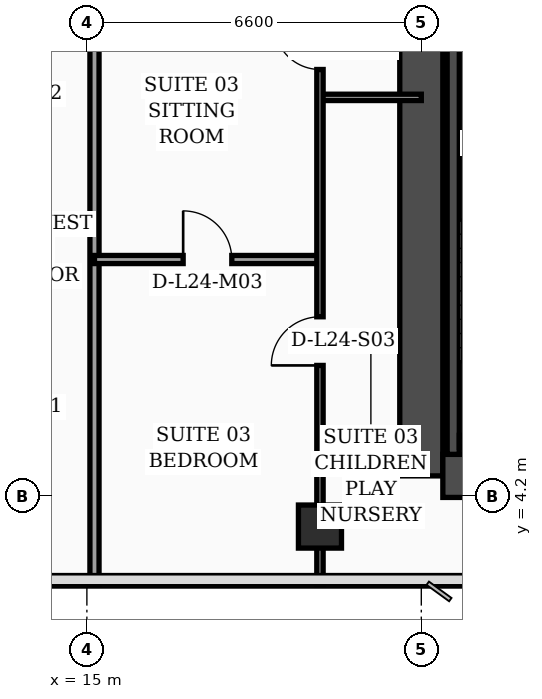
"""IFC4 building model, lengths in metres.
Left out: names, types, materials, properties, quantities, classifications, styles, units other than length and angle.
Written with IfcOpenShell. Run it as: python <this file> out.ifc"""

import sys

from ifc_helpers import new_model, si_unit, direction, frame, frame_2d, origin, origin_2d, place, context, subcontext, project, spatial, rectangle, hollow_rectangle, extrude, element, fill, save


model = new_model("IFC4")
c1 = context("Model", 3, precision=1e-05, world=origin(), true_north=direction((0.0, 1.0)))
c2 = subcontext(c1, "Body", "Model", "MODEL_VIEW")
j1 = project(units=[si_unit("LENGTHUNIT", "METRE"), si_unit("PLANEANGLEUNIT", "RADIAN")], contexts=[c1])
p1 = place(None, origin())
s1 = spatial("IfcSite", under=j1, at=p1, CompositionType="ELEMENT")
p2 = place(p1, origin())
s2 = spatial("IfcBuilding", under=s1, at=p2, CompositionType="ELEMENT")
p3 = place(p2, frame((0.0, 0.0, 101.2)))
s3 = spatial("IfcBuildingStorey", under=s2, at=p3, CompositionType="ELEMENT", Elevation=101.2)
p4 = place(p3, frame((21.6, 4.6, 0.0), z_axis=(0.0, 0.0, 1.0), x_axis=(0.0, 1.0, 0.0)))
e1 = element("IfcWall", 1, at=p4, inside=s3, PredefinedType="SHEAR", context=c2, shape_type="SweptSolid", body=[
    extrude(rectangle(XDim=10.4, YDim=0.85, at=frame_2d((5.2, 0.0))), origin(), (0.0, 0.0, 1.0), 3.56),
])
p5 = place(p3, frame((22.025, 4.6, 0.0), z_axis=(0.0, 0.0, 1.0), x_axis=(1.0, 0.0, 0.0)))
e2 = element("IfcWall", 2, at=p5, inside=s3, PredefinedType="SHEAR", context=c2, shape_type="SweptSolid", body=[
    extrude(rectangle(XDim=9.95, YDim=0.85, at=frame_2d((4.975, 0.0))), origin(), (0.0, 0.0, 1.0), 3.56),
])
p6 = place(p3, frame((22.23, 5.025, 0.0), z_axis=(0.0, 0.0, 1.0), x_axis=(0.0, 1.0, 0.0)))
e3 = element("IfcWall", 3, at=p6, inside=s3, PredefinedType="SOLIDWALL", context=c2, shape_type="SweptSolid", body=[
    extrude(rectangle(XDim=9.465, YDim=0.24, at=frame_2d((4.732, 0.0))), origin(), (0.0, 0.0, 1.0), 3.56),
])
p7 = place(p3, frame((22.35, 5.28, 0.0), z_axis=(0.0, 0.0, 1.0), x_axis=(1.0, 0.0, 0.0)))
e4 = element("IfcWall", 4, at=p7, inside=s3, PredefinedType="SOLIDWALL", context=c2, shape_type="SweptSolid", body=[
    extrude(rectangle(XDim=3.1, YDim=0.24, at=frame_2d((1.55, 0.0))), origin(), (0.0, 0.0, 1.0), 3.56),
])
p8 = place(p3, frame((19.6, 3.6, 0.0), z_axis=(0.0, 0.0, 1.0), x_axis=(1.0, 0.0, 0.0)))
e5 = element("IfcColumn", 5, at=p8, inside=s3, PredefinedType="COLUMN", context=c2, shape_type="SweptSolid", body=[
    extrude(hollow_rectangle(XDim=0.85, YDim=0.85, WallThickness=0.036, at=origin_2d()), origin(), (0.0, 0.0, 1.0), 3.56),
])
p9 = place(p3, frame((15.15, 2.44, 0.0), z_axis=(0.0, 0.0, 1.0), x_axis=(0.0, 1.0, 0.0)))
e6 = element("IfcWall", 6, at=p9, inside=s3, PredefinedType="PARTITIONING", context=c2, shape_type="SweptSolid", body=[
    extrude(rectangle(XDim=12.71, YDim=0.18, at=frame_2d((6.355, 0.0))), origin(), (0.0, 0.0, 1.0), 3.04),
])
p10 = place(p3, frame((19.6, 12.07, 0.0), z_axis=(0.0, 0.0, 1.0), x_axis=(1.0, 0.0, 0.0)))
e7 = element("IfcWall", 7, at=p10, inside=s3, PredefinedType="PARTITIONING", context=c2, shape_type="SweptSolid", body=[
    extrude(rectangle(XDim=2.0, YDim=0.125, at=frame_2d((1.0, 0.0))), origin(), (0.0, 0.0, 1.0), 3.56),
])
p11 = place(p3, frame((15.15, 8.87, 0.0), z_axis=(0.0, 0.0, 1.0), x_axis=(1.0, 0.0, 0.0)))
e8 = element("IfcWall", 8, at=p11, inside=s3, PredefinedType="PARTITIONING", context=c2, shape_type="SweptSolid", body=[
    extrude(rectangle(XDim=4.45, YDim=0.16, at=frame_2d((2.225, 0.0))), origin(), (0.0, 0.0, 1.0), 3.56),
])
p12 = place(p11, frame((1.75, 0.0, 0.0)))
e9 = element("IfcOpeningElement", 9, at=p12, cuts=e8, PredefinedType="OPENING", context=c2, shape_type="SweptSolid", body=[
    extrude(rectangle(XDim=0.96, YDim=2.2, at=frame_2d((0.48, 1.1))), frame((0.0, 0.09, 0.0), z_axis=(0.0, -1.0, 0.0), x_axis=(1.0, 0.0, 0.0)), (0.0, 0.0, 1.0), 0.18),
])
p13 = place(p3, frame((19.6, 2.44, 0.0), z_axis=(0.0, 0.0, 1.0), x_axis=(0.0, 1.0, 0.0)))
e10 = element("IfcWall", 10, at=p13, inside=s3, PredefinedType="PARTITIONING", context=c2, shape_type="SweptSolid", body=[
    extrude(rectangle(XDim=12.71, YDim=0.125, at=frame_2d((6.355, 0.0))), origin(), (0.0, 0.0, 1.0), 2.49),
])
p14 = place(p13, frame((4.34, 0.0, 0.0)))
e11 = element("IfcOpeningElement", 11, at=p14, cuts=e10, PredefinedType="OPENING", context=c2, shape_type="SweptSolid", body=[
    extrude(rectangle(XDim=0.96, YDim=2.2, at=frame_2d((0.48, 1.1))), frame((0.0, 0.073, 0.0), z_axis=(0.0, -1.0, 0.0), x_axis=(1.0, 0.0, 0.0)), (0.0, 0.0, 1.0), 0.145),
])
p15 = place(p13, frame((10.18, 0.0, 0.0)))
e12 = element("IfcOpeningElement", 12, at=p15, cuts=e10, PredefinedType="OPENING", context=c2, shape_type="SweptSolid", body=[
    extrude(rectangle(XDim=0.9, YDim=2.15, at=frame_2d((0.45, 1.075))), frame((0.0, 0.073, 0.0), z_axis=(0.0, -1.0, 0.0), x_axis=(1.0, 0.0, 0.0)), (0.0, 0.0, 1.0), 0.145),
])
p16 = place(p12, origin())
e13 = element("IfcDoor", 13, at=p16, inside=s3, OperationType="SINGLE_SWING_LEFT", PredefinedType="DOOR", context=c2, shape_type="SweptSolid", body=[
    extrude(rectangle(XDim=0.96, YDim=2.2, at=frame_2d((0.48, 1.1))), frame((0.0, 0.025, 0.0), z_axis=(0.0, -1.0, 0.0), x_axis=(1.0, 0.0, 0.0)), (0.0, 0.0, 1.0), 0.05),
])
fill(e9, e13)
p17 = place(p14, origin())
e14 = element("IfcDoor", 14, at=p17, inside=s3, OperationType="SINGLE_SWING_LEFT", PredefinedType="DOOR", context=c2, shape_type="SweptSolid", body=[
    extrude(rectangle(XDim=0.96, YDim=2.2, at=frame_2d((0.48, 1.1))), frame((0.0, 0.025, 0.0), z_axis=(0.0, -1.0, 0.0), x_axis=(1.0, 0.0, 0.0)), (0.0, 0.0, 1.0), 0.05),
])
fill(e11, e14)
p18 = place(p15, origin())
e15 = element("IfcDoor", 15, at=p18, inside=s3, OperationType="SINGLE_SWING_RIGHT", PredefinedType="DOOR", context=c2, shape_type="SweptSolid", body=[
    extrude(rectangle(XDim=0.9, YDim=2.15, at=frame_2d((0.45, 1.075))), frame((0.0, 0.025, 0.0), z_axis=(0.0, -1.0, 0.0), x_axis=(1.0, 0.0, 0.0)), (0.0, 0.0, 1.0), 0.05),
])
fill(e12, e15)
save(model, sys.argv[1])
